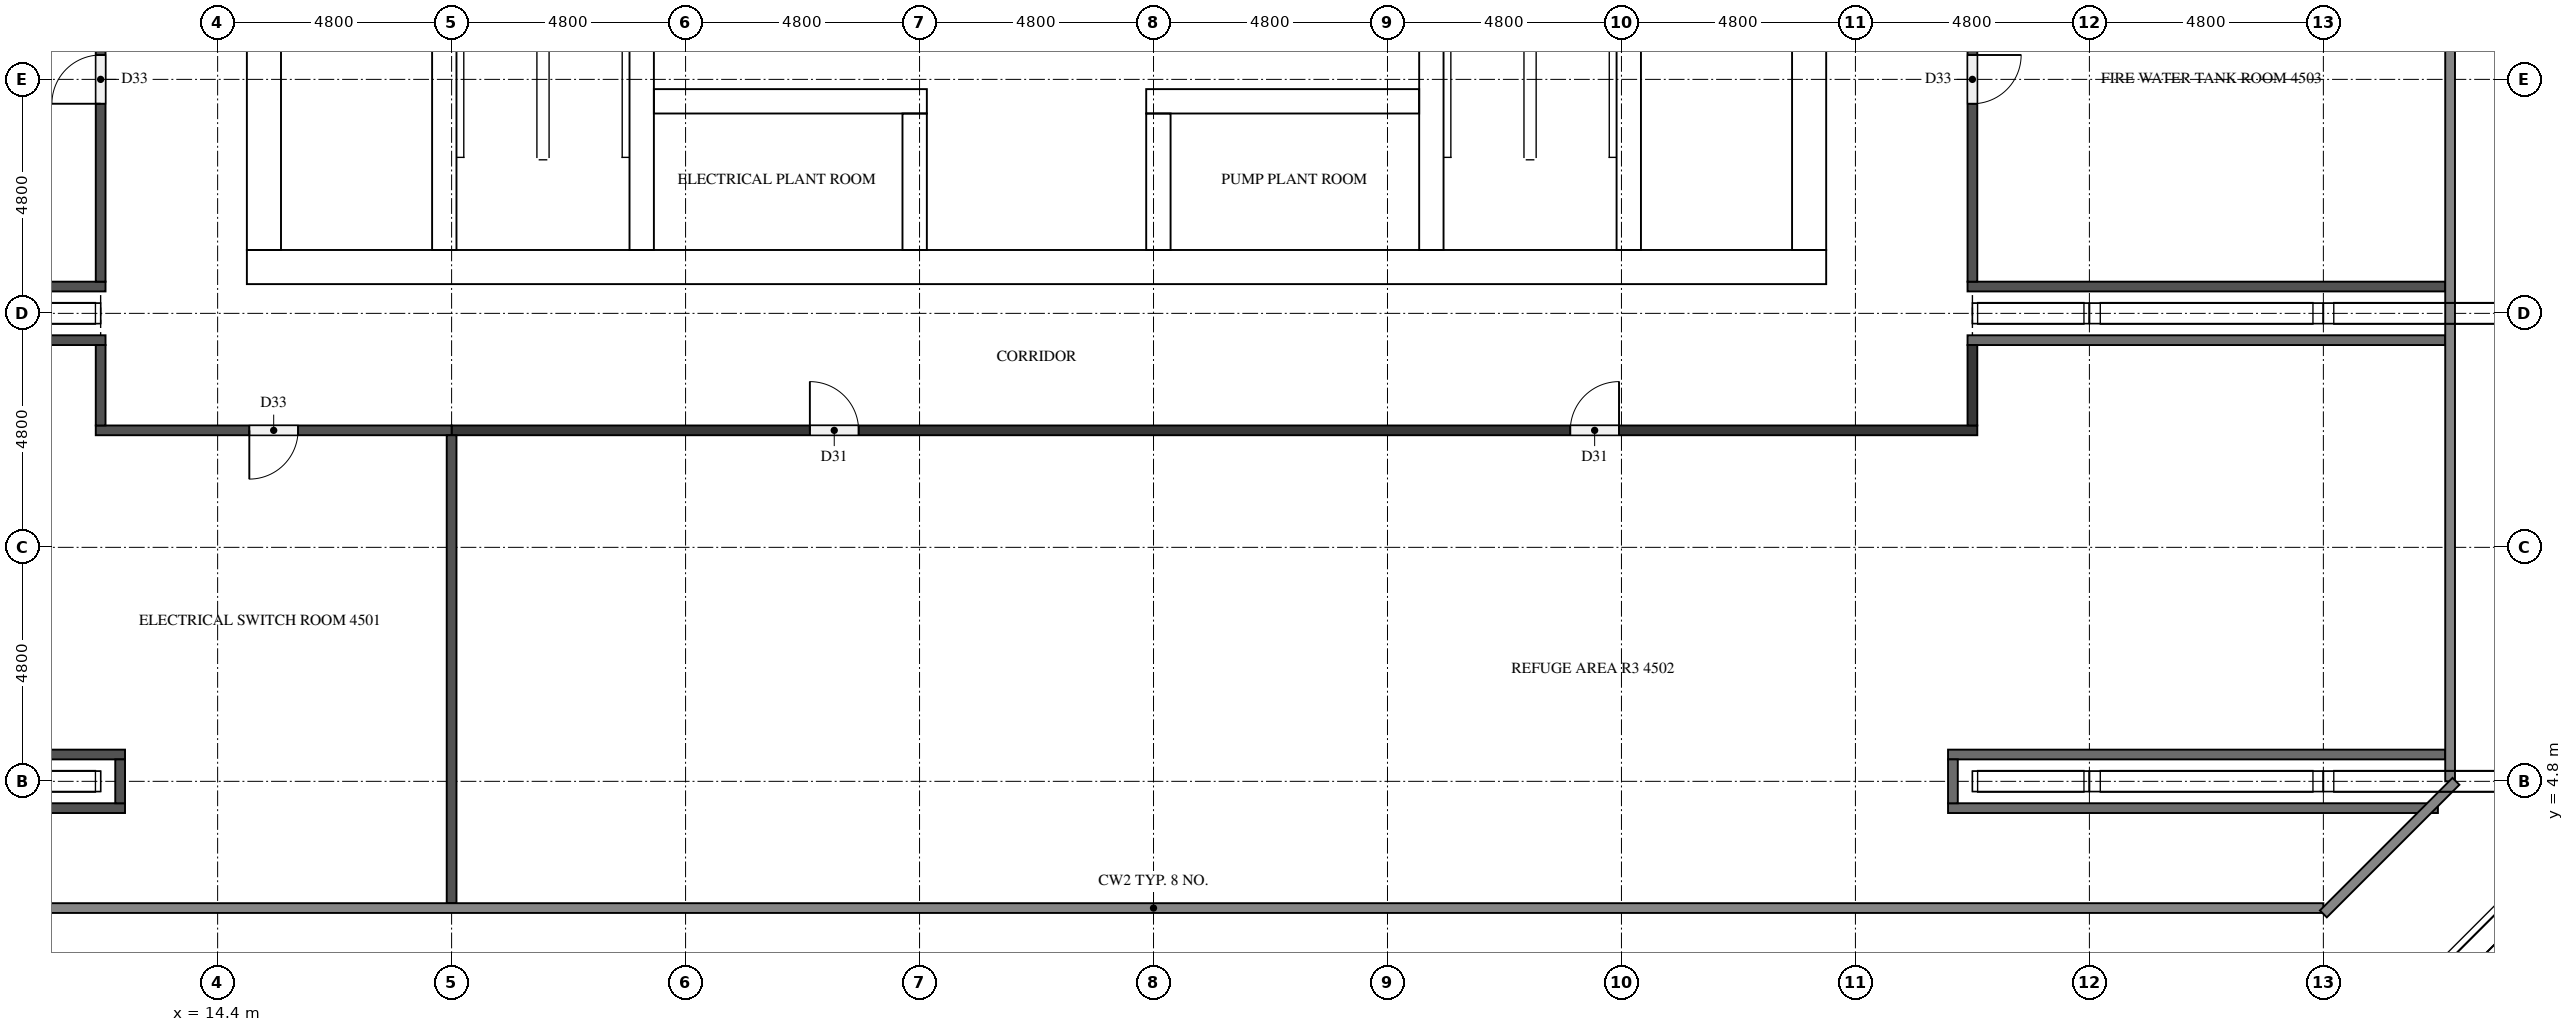
"""IFC4 building model, lengths in metres.
Left out: names, types, materials, properties, quantities, classifications, styles, units other than length and angle.
Written with IfcOpenShell. Run it as: python <this file> out.ifc"""

import sys

from ifc_helpers import new_model, si_unit, direction, frame, frame_2d, origin, place, context, subcontext, project, spatial, rectangle, extrude, element, fill, save


model = new_model("IFC4")
c1 = context("Model", 3, precision=1e-05, world=origin(), true_north=direction((0.0, 1.0)))
c2 = subcontext(c1, "Body", "Model", "MODEL_VIEW")
j1 = project(units=[si_unit("LENGTHUNIT", "METRE"), si_unit("PLANEANGLEUNIT", "RADIAN")], contexts=[c1])
p1 = place(None, origin())
s1 = spatial("IfcSite", under=j1, at=p1, CompositionType="ELEMENT")
p2 = place(p1, origin())
s2 = spatial("IfcBuilding", under=s1, at=p2, CompositionType="ELEMENT")
p3 = place(p2, frame((0.0, 0.0, 173.5)))
s3 = spatial("IfcBuildingStorey", under=s2, at=p3, CompositionType="ELEMENT", Elevation=173.5)
p4 = place(p3, frame((15.0, 15.35, 0.0), z_axis=(0.0, 0.0, 1.0), x_axis=(1.0, 0.0, 0.0)))
e1 = element("IfcWall", 1, at=p4, inside=s3, PredefinedType="SHEAR", context=c2, shape_type="SweptSolid", body=[
    extrude(rectangle(XDim=32.4, YDim=0.7, at=frame_2d((16.2, 0.0))), origin(), (0.0, 0.0, 1.0), 5.1),
])
p5 = place(p4, frame((15.3, 0.0, 0.0)))
e2 = element("IfcOpeningElement", 2, at=p5, cuts=e1, PredefinedType="OPENING", context=c2, shape_type="SweptSolid", body=[
    extrude(rectangle(XDim=1.8, YDim=2.1, at=frame_2d((0.9, 1.05))), frame((0.0, 0.36, 0.0), z_axis=(0.0, -1.0, 0.0), x_axis=(1.0, 0.0, 0.0)), (0.0, 0.0, 1.0), 0.72),
])
p6 = place(p3, frame((15.35, 15.7, 0.0), z_axis=(0.0, 0.0, 1.0), x_axis=(0.0, 1.0, 0.0)))
e3 = element("IfcWall", 3, at=p6, inside=s3, PredefinedType="SHEAR", context=c2, shape_type="SweptSolid", body=[
    extrude(rectangle(XDim=21.4, YDim=0.7, at=frame_2d((10.7, 0.0))), origin(), (0.0, 0.0, 1.0), 5.1),
])
p7 = place(p6, frame((5.06, 0.0, 0.0)))
e4 = element("IfcOpeningElement", 4, at=p7, cuts=e3, PredefinedType="OPENING", context=c2, shape_type="SweptSolid", body=[
    extrude(rectangle(XDim=1.2, YDim=2.1, at=frame_2d((0.6, 1.05))), frame((0.0, 0.36, 0.0), z_axis=(0.0, -1.0, 0.0), x_axis=(1.0, 0.0, 0.0)), (0.0, 0.0, 1.0), 0.72),
])
p8 = place(p3, frame((47.05, 15.7, 0.0), z_axis=(0.0, 0.0, 1.0), x_axis=(0.0, 1.0, 0.0)))
e5 = element("IfcWall", 5, at=p8, inside=s3, PredefinedType="SHEAR", context=c2, shape_type="SweptSolid", body=[
    extrude(rectangle(XDim=21.4, YDim=0.7, at=frame_2d((10.7, 0.0))), origin(), (0.0, 0.0, 1.0), 5.1),
])
p9 = place(p8, frame((10.4, 0.0, 0.0)))
e6 = element("IfcOpeningElement", 6, at=p9, cuts=e5, PredefinedType="OPENING", context=c2, shape_type="SweptSolid", body=[
    extrude(rectangle(XDim=1.2, YDim=2.1, at=frame_2d((0.6, 1.05))), frame((0.0, 0.36, 0.0), z_axis=(0.0, -1.0, 0.0), x_axis=(1.0, 0.0, 0.0)), (0.0, 0.0, 1.0), 0.72),
])
p10 = place(p3, frame((19.05, 15.7, 0.0), z_axis=(0.0, 0.0, 1.0), x_axis=(0.0, 1.0, 0.0)))
e7 = element("IfcWall", 7, at=p10, inside=s3, PredefinedType="SHEAR", context=c2, shape_type="SweptSolid", body=[
    extrude(rectangle(XDim=15.3, YDim=0.5, at=frame_2d((7.65, 0.0))), origin(), (0.0, 0.0, 1.0), 5.1),
])
p11 = place(p10, frame((9.75, 0.0, 0.0)))
e8 = element("IfcOpeningElement", 8, at=p11, cuts=e7, PredefinedType="OPENING", context=c2, shape_type="SweptSolid", body=[
    extrude(rectangle(XDim=1.1, YDim=2.1, at=frame_2d((0.55, 1.05))), frame((0.0, 0.26, 0.0), z_axis=(0.0, -1.0, 0.0), x_axis=(1.0, 0.0, 0.0)), (0.0, 0.0, 1.0), 0.52),
])
p12 = place(p10, frame((13.25, 0.0, 0.0)))
e9 = element("IfcOpeningElement", 9, at=p12, cuts=e7, PredefinedType="OPENING", context=c2, shape_type="SweptSolid", body=[
    extrude(rectangle(XDim=1.1, YDim=2.1, at=frame_2d((0.55, 1.05))), frame((0.0, 0.26, 0.0), z_axis=(0.0, -1.0, 0.0), x_axis=(1.0, 0.0, 0.0)), (0.0, 0.0, 1.0), 0.52),
])
p13 = place(p10, frame((0.5, 0.0, 0.0)))
e10 = element("IfcOpeningElement", 10, at=p13, cuts=e7, PredefinedType="OPENING", context=c2, shape_type="SweptSolid", body=[
    extrude(rectangle(XDim=1.2, YDim=2.1, at=frame_2d((0.6, 1.05))), frame((0.0, 0.26, 0.0), z_axis=(0.0, -1.0, 0.0), x_axis=(1.0, 0.0, 0.0)), (0.0, 0.0, 1.0), 0.52),
])
p14 = place(p3, frame((23.1, 15.7, 0.0), z_axis=(0.0, 0.0, 1.0), x_axis=(0.0, 1.0, 0.0)))
e11 = element("IfcWall", 11, at=p14, inside=s3, PredefinedType="SHEAR", context=c2, shape_type="SweptSolid", body=[
    extrude(rectangle(XDim=21.4, YDim=0.5, at=frame_2d((10.7, 0.0))), origin(), (0.0, 0.0, 1.0), 5.1),
])
p15 = place(p3, frame((39.3, 15.7, 0.0), z_axis=(0.0, 0.0, 1.0), x_axis=(0.0, 1.0, 0.0)))
e12 = element("IfcWall", 12, at=p15, inside=s3, PredefinedType="SHEAR", context=c2, shape_type="SweptSolid", body=[
    extrude(rectangle(XDim=8.55, YDim=0.5, at=frame_2d((4.275, 0.0))), origin(), (0.0, 0.0, 1.0), 5.1),
])
p16 = place(p3, frame((43.35, 15.7, 0.0), z_axis=(0.0, 0.0, 1.0), x_axis=(0.0, 1.0, 0.0)))
e13 = element("IfcWall", 13, at=p16, inside=s3, PredefinedType="SHEAR", context=c2, shape_type="SweptSolid", body=[
    extrude(rectangle(XDim=8.55, YDim=0.5, at=frame_2d((4.275, 0.0))), origin(), (0.0, 0.0, 1.0), 5.1),
])
p17 = place(p16, frame((0.5, 0.0, 0.0)))
e14 = element("IfcOpeningElement", 14, at=p17, cuts=e13, PredefinedType="OPENING", context=c2, shape_type="SweptSolid", body=[
    extrude(rectangle(XDim=1.2, YDim=2.1, at=frame_2d((0.6, 1.05))), frame((0.0, 0.26, 0.0), z_axis=(0.0, -1.0, 0.0), x_axis=(1.0, 0.0, 0.0)), (0.0, 0.0, 1.0), 0.52),
])
p18 = place(p3, frame((23.35, 18.75, 0.0), z_axis=(0.0, 0.0, 1.0), x_axis=(1.0, 0.0, 0.0)))
e15 = element("IfcWall", 15, at=p18, inside=s3, PredefinedType="SHEAR", context=c2, shape_type="SweptSolid", body=[
    extrude(rectangle(XDim=5.6, YDim=0.5, at=frame_2d((2.8, 0.0))), origin(), (0.0, 0.0, 1.0), 5.1),
])
p19 = place(p18, frame((2.05, 0.0, 0.0)))
e16 = element("IfcOpeningElement", 16, at=p19, cuts=e15, PredefinedType="OPENING", context=c2, shape_type="SweptSolid", body=[
    extrude(rectangle(XDim=1.0, YDim=2.1, at=frame_2d((0.5, 1.05))), frame((0.0, 0.26, 0.0), z_axis=(0.0, -1.0, 0.0), x_axis=(1.0, 0.0, 0.0)), (0.0, 0.0, 1.0), 0.52),
])
p20 = place(p3, frame((33.45, 18.75, 0.0), z_axis=(0.0, 0.0, 1.0), x_axis=(1.0, 0.0, 0.0)))
e17 = element("IfcWall", 17, at=p20, inside=s3, PredefinedType="SHEAR", context=c2, shape_type="SweptSolid", body=[
    extrude(rectangle(XDim=5.6, YDim=0.5, at=frame_2d((2.8, 0.0))), origin(), (0.0, 0.0, 1.0), 5.1),
])
p21 = place(p20, frame((2.55, 0.0, 0.0)))
e18 = element("IfcOpeningElement", 18, at=p21, cuts=e17, PredefinedType="OPENING", context=c2, shape_type="SweptSolid", body=[
    extrude(rectangle(XDim=1.0, YDim=2.1, at=frame_2d((0.5, 1.05))), frame((0.0, 0.26, 0.0), z_axis=(0.0, -1.0, 0.0), x_axis=(1.0, 0.0, 0.0)), (0.0, 0.0, 1.0), 0.52),
])
for number, where, z_axis, x_axis in (
    (19, (28.7, 15.7, 0.0), (0.0, 0.0, 1.0), (0.0, 1.0, 0.0)),
    (20, (33.7, 15.7, 0.0), (0.0, 0.0, 1.0), (0.0, 1.0, 0.0)),
):
    element("IfcWall", number, at=place(p3, frame(where, z_axis=z_axis, x_axis=x_axis)), inside=s3, PredefinedType="SHEAR", context=c2, shape_type="SweptSolid", body=[
        extrude(rectangle(XDim=2.8, YDim=0.5, at=frame_2d((1.4, 0.0))), origin(), (0.0, 0.0, 1.0), 5.1),
    ])
p22 = place(p3, frame((49.9, 4.25, 0.0), z_axis=(0.0, 0.0, 1.0), x_axis=(1.0, 0.0, 0.0)))
e21 = element("IfcWall", 21, at=p22, inside=s3, PredefinedType="PARTITIONING", context=c2, shape_type="SweptSolid", body=[
    extrude(rectangle(XDim=10.05, YDim=0.2, at=frame_2d((5.025, 0.0))), origin(), (0.0, 0.0, 1.0), 5.1),
])
p23 = place(p3, frame((7.25, 4.25, 0.0), z_axis=(0.0, 0.0, 1.0), x_axis=(1.0, 0.0, 0.0)))
e22 = element("IfcWall", 22, at=p23, inside=s3, PredefinedType="PARTITIONING", context=c2, shape_type="SweptSolid", body=[
    extrude(rectangle(XDim=5.25, YDim=0.2, at=frame_2d((2.625, 0.0))), origin(), (0.0, 0.0, 1.0), 5.1),
])
p24 = place(p3, frame((49.9, 5.35, 0.0), z_axis=(0.0, 0.0, 1.0), x_axis=(1.0, 0.0, 0.0)))
e23 = element("IfcWall", 23, at=p24, inside=s3, PredefinedType="PARTITIONING", context=c2, shape_type="SweptSolid", body=[
    extrude(rectangle(XDim=10.2, YDim=0.2, at=frame_2d((5.1, 0.0))), origin(), (0.0, 0.0, 1.0), 5.1),
])
p25 = place(p3, frame((7.1, 5.35, 0.0), z_axis=(0.0, 0.0, 1.0), x_axis=(1.0, 0.0, 0.0)))
e24 = element("IfcWall", 24, at=p25, inside=s3, PredefinedType="PARTITIONING", context=c2, shape_type="SweptSolid", body=[
    extrude(rectangle(XDim=5.4, YDim=0.2, at=frame_2d((2.7, 0.0))), origin(), (0.0, 0.0, 1.0), 5.1),
])
p26 = place(p3, frame((19.2, 12.0, 0.0), z_axis=(0.0, 0.0, 1.0), x_axis=(1.0, 0.0, 0.0)))
e25 = element("IfcWall", 25, at=p26, inside=s3, PredefinedType="PARTITIONING", context=c2, shape_type="SweptSolid", body=[
    extrude(rectangle(XDim=31.3, YDim=0.2, at=frame_2d((15.65, 0.0))), origin(), (0.0, 0.0, 1.0), 5.1),
])
p27 = place(p26, frame((22.95, 0.0, 0.0)))
e26 = element("IfcOpeningElement", 26, at=p27, cuts=e25, PredefinedType="OPENING", context=c2, shape_type="SweptSolid", body=[
    extrude(rectangle(XDim=1.0, YDim=2.1, at=frame_2d((0.5, 1.05))), frame((0.0, 0.11, 0.0), z_axis=(0.0, -1.0, 0.0), x_axis=(1.0, 0.0, 0.0)), (0.0, 0.0, 1.0), 0.22),
])
p28 = place(p26, frame((7.35, 0.0, 0.0)))
e27 = element("IfcOpeningElement", 27, at=p28, cuts=e25, PredefinedType="OPENING", context=c2, shape_type="SweptSolid", body=[
    extrude(rectangle(XDim=1.0, YDim=2.1, at=frame_2d((0.5, 1.05))), frame((0.0, 0.11, 0.0), z_axis=(0.0, -1.0, 0.0), x_axis=(1.0, 0.0, 0.0)), (0.0, 0.0, 1.0), 0.22),
])
p29 = place(p3, frame((19.2, 12.0, 0.0), z_axis=(0.0, 0.0, 1.0), x_axis=(-1.0, 0.0, 0.0)))
e28 = element("IfcWall", 28, at=p29, inside=s3, PredefinedType="PARTITIONING", context=c2, shape_type="SweptSolid", body=[
    extrude(rectangle(XDim=7.3, YDim=0.2, at=frame_2d((3.65, 0.0))), origin(), (0.0, 0.0, 1.0), 5.1),
])
p30 = place(p29, frame((3.15, 0.0, 0.0)))
e29 = element("IfcOpeningElement", 29, at=p30, cuts=e28, PredefinedType="OPENING", context=c2, shape_type="SweptSolid", body=[
    extrude(rectangle(XDim=1.0, YDim=2.1, at=frame_2d((0.5, 1.05))), frame((0.0, 0.11, 0.0), z_axis=(0.0, -1.0, 0.0), x_axis=(1.0, 0.0, 0.0)), (0.0, 0.0, 1.0), 0.22),
])
p31 = place(p3, frame((50.3, 13.85, 0.0), z_axis=(0.0, 0.0, 1.0), x_axis=(1.0, 0.0, 0.0)))
e30 = element("IfcWall", 30, at=p31, inside=s3, PredefinedType="PARTITIONING", context=c2, shape_type="SweptSolid", body=[
    extrude(rectangle(XDim=9.8, YDim=0.2, at=frame_2d((4.9, 0.0))), origin(), (0.0, 0.0, 1.0), 5.1),
])
for number, where, z_axis, x_axis in (
    (31, (7.1, 13.85, 0.0), (0.0, 0.0, 1.0), (1.0, 0.0, 0.0)),
    (32, (7.1, 14.95, 0.0), (0.0, 0.0, 1.0), (1.0, 0.0, 0.0)),
):
    element("IfcWall", number, at=place(p3, frame(where, z_axis=z_axis, x_axis=x_axis)), inside=s3, PredefinedType="PARTITIONING", context=c2, shape_type="SweptSolid", body=[
        extrude(rectangle(XDim=5.0, YDim=0.2, at=frame_2d((2.5, 0.0))), origin(), (0.0, 0.0, 1.0), 5.1),
    ])
p32 = place(p3, frame((50.3, 14.95, 0.0), z_axis=(0.0, 0.0, 1.0), x_axis=(1.0, 0.0, 0.0)))
e33 = element("IfcWall", 33, at=p32, inside=s3, PredefinedType="PARTITIONING", context=c2, shape_type="SweptSolid", body=[
    extrude(rectangle(XDim=9.8, YDim=0.2, at=frame_2d((4.9, 0.0))), origin(), (0.0, 0.0, 1.0), 5.1),
])
p33 = place(p3, frame((12.0, 12.1, 0.0), z_axis=(0.0, 0.0, 1.0), x_axis=(0.0, 1.0, 0.0)))
e34 = element("IfcWall", 34, at=p33, inside=s3, PredefinedType="PARTITIONING", context=c2, shape_type="SweptSolid", body=[
    extrude(rectangle(XDim=1.65, YDim=0.2, at=frame_2d((0.825, 0.0))), origin(), (0.0, 0.0, 1.0), 5.1),
])
p34 = place(p3, frame((12.0, 15.05, 0.0), z_axis=(0.0, 0.0, 1.0), x_axis=(0.0, 1.0, 0.0)))
e35 = element("IfcWall", 35, at=p34, inside=s3, PredefinedType="PARTITIONING", context=c2, shape_type="SweptSolid", body=[
    extrude(rectangle(XDim=8.3, YDim=0.2, at=frame_2d((4.15, 0.0))), origin(), (0.0, 0.0, 1.0), 5.1),
])
p35 = place(p34, frame((3.65, 0.0, 0.0)))
e36 = element("IfcOpeningElement", 36, at=p35, cuts=e35, PredefinedType="OPENING", context=c2, shape_type="SweptSolid", body=[
    extrude(rectangle(XDim=1.0, YDim=2.1, at=frame_2d((0.5, 1.05))), frame((0.0, 0.11, 0.0), z_axis=(0.0, -1.0, 0.0), x_axis=(1.0, 0.0, 0.0)), (0.0, 0.0, 1.0), 0.22),
])
p36 = place(p3, frame((12.4, 4.35, 0.0), z_axis=(0.0, 0.0, 1.0), x_axis=(0.0, 1.0, 0.0)))
e37 = element("IfcWall", 37, at=p36, inside=s3, PredefinedType="PARTITIONING", context=c2, shape_type="SweptSolid", body=[
    extrude(rectangle(XDim=0.9, YDim=0.2, at=frame_2d((0.45, 0.0))), origin(), (0.0, 0.0, 1.0), 5.1),
])
p37 = place(p3, frame((19.2, 2.3, 0.0), z_axis=(0.0, 0.0, 1.0), x_axis=(0.0, 1.0, 0.0)))
e38 = element("IfcWall", 38, at=p37, inside=s3, PredefinedType="PARTITIONING", context=c2, shape_type="SweptSolid", body=[
    extrude(rectangle(XDim=9.6, YDim=0.2, at=frame_2d((4.8, 0.0))), origin(), (0.0, 0.0, 1.0), 5.1),
])
p38 = place(p3, frame((50.0, 4.35, 0.0), z_axis=(0.0, 0.0, 1.0), x_axis=(0.0, 1.0, 0.0)))
e39 = element("IfcWall", 39, at=p38, inside=s3, PredefinedType="PARTITIONING", context=c2, shape_type="SweptSolid", body=[
    extrude(rectangle(XDim=0.9, YDim=0.2, at=frame_2d((0.45, 0.0))), origin(), (0.0, 0.0, 1.0), 5.1),
])
p39 = place(p3, frame((50.4, 12.1, 0.0), z_axis=(0.0, 0.0, 1.0), x_axis=(0.0, 1.0, 0.0)))
e40 = element("IfcWall", 40, at=p39, inside=s3, PredefinedType="PARTITIONING", context=c2, shape_type="SweptSolid", body=[
    extrude(rectangle(XDim=1.65, YDim=0.2, at=frame_2d((0.825, 0.0))), origin(), (0.0, 0.0, 1.0), 5.1),
])
p40 = place(p3, frame((50.4, 23.35, 0.0), z_axis=(0.0, 0.0, 1.0), x_axis=(0.0, -1.0, 0.0)))
e41 = element("IfcWall", 41, at=p40, inside=s3, PredefinedType="PARTITIONING", context=c2, shape_type="SweptSolid", body=[
    extrude(rectangle(XDim=8.3, YDim=0.2, at=frame_2d((4.15, 0.0))), origin(), (0.0, 0.0, 1.0), 5.1),
])
p41 = place(p40, frame((3.65, 0.0, 0.0)))
e42 = element("IfcOpeningElement", 42, at=p41, cuts=e41, PredefinedType="OPENING", context=c2, shape_type="SweptSolid", body=[
    extrude(rectangle(XDim=1.0, YDim=2.1, at=frame_2d((0.5, 1.05))), frame((0.0, 0.11, 0.0), z_axis=(0.0, -1.0, 0.0), x_axis=(1.0, 0.0, 0.0)), (0.0, 0.0, 1.0), 0.22),
])
p42 = place(p13, frame((1.2, 0.0, 0.0), z_axis=(0.0, 0.0, 1.0), x_axis=(-1.0, 0.0, 0.0)))
e43 = element("IfcDoor", 43, at=p42, inside=s3, OperationType="SINGLE_SWING_LEFT", PredefinedType="DOOR", context=c2, shape_type="SweptSolid", body=[
    extrude(rectangle(XDim=1.2, YDim=2.1, at=frame_2d((0.6, 1.05))), frame((0.0, 0.025, 0.0), z_axis=(0.0, -1.0, 0.0), x_axis=(1.0, 0.0, 0.0)), (0.0, 0.0, 1.0), 0.05),
])
fill(e10, e43)
p43 = place(p17, origin())
e44 = element("IfcDoor", 44, at=p43, inside=s3, OperationType="SINGLE_SWING_RIGHT", PredefinedType="DOOR", context=c2, shape_type="SweptSolid", body=[
    extrude(rectangle(XDim=1.2, YDim=2.1, at=frame_2d((0.6, 1.05))), frame((0.0, 0.025, 0.0), z_axis=(0.0, -1.0, 0.0), x_axis=(1.0, 0.0, 0.0)), (0.0, 0.0, 1.0), 0.05),
])
fill(e14, e44)
p44 = place(p5, frame((1.8, 0.0, 0.0), z_axis=(0.0, 0.0, 1.0), x_axis=(-1.0, 0.0, 0.0)))
e45 = element("IfcDoor", 45, at=p44, inside=s3, OperationType="DOUBLE_DOOR_SINGLE_SWING", PredefinedType="DOOR", context=c2, shape_type="SweptSolid", body=[
    extrude(rectangle(XDim=1.8, YDim=2.1, at=frame_2d((0.9, 1.05))), frame((0.0, 0.025, 0.0), z_axis=(0.0, -1.0, 0.0), x_axis=(1.0, 0.0, 0.0)), (0.0, 0.0, 1.0), 0.05),
])
fill(e2, e45)
p45 = place(p19, origin())
e46 = element("IfcDoor", 46, at=p45, inside=s3, OperationType="SINGLE_SWING_RIGHT", PredefinedType="DOOR", context=c2, shape_type="SweptSolid", body=[
    extrude(rectangle(XDim=1.0, YDim=2.1, at=frame_2d((0.5, 1.05))), frame((0.0, 0.025, 0.0), z_axis=(0.0, -1.0, 0.0), x_axis=(1.0, 0.0, 0.0)), (0.0, 0.0, 1.0), 0.05),
])
fill(e16, e46)
p46 = place(p21, origin())
e47 = element("IfcDoor", 47, at=p46, inside=s3, OperationType="SINGLE_SWING_LEFT", PredefinedType="DOOR", context=c2, shape_type="SweptSolid", body=[
    extrude(rectangle(XDim=1.0, YDim=2.1, at=frame_2d((0.5, 1.05))), frame((0.0, 0.025, 0.0), z_axis=(0.0, -1.0, 0.0), x_axis=(1.0, 0.0, 0.0)), (0.0, 0.0, 1.0), 0.05),
])
fill(e18, e47)
p47 = place(p30, origin())
e48 = element("IfcDoor", 48, at=p47, inside=s3, OperationType="SINGLE_SWING_RIGHT", PredefinedType="DOOR", context=c2, shape_type="SweptSolid", body=[
    extrude(rectangle(XDim=1.0, YDim=2.1, at=frame_2d((0.5, 1.05))), frame((0.0, 0.025, 0.0), z_axis=(0.0, -1.0, 0.0), x_axis=(1.0, 0.0, 0.0)), (0.0, 0.0, 1.0), 0.05),
])
fill(e29, e48)
p48 = place(p27, origin())
e49 = element("IfcDoor", 49, at=p48, inside=s3, OperationType="SINGLE_SWING_RIGHT", PredefinedType="DOOR", context=c2, shape_type="SweptSolid", body=[
    extrude(rectangle(XDim=1.0, YDim=2.1, at=frame_2d((0.5, 1.05))), frame((0.0, 0.025, 0.0), z_axis=(0.0, -1.0, 0.0), x_axis=(1.0, 0.0, 0.0)), (0.0, 0.0, 1.0), 0.05),
])
fill(e26, e49)
p49 = place(p28, origin())
e50 = element("IfcDoor", 50, at=p49, inside=s3, OperationType="SINGLE_SWING_LEFT", PredefinedType="DOOR", context=c2, shape_type="SweptSolid", body=[
    extrude(rectangle(XDim=1.0, YDim=2.1, at=frame_2d((0.5, 1.05))), frame((0.0, 0.025, 0.0), z_axis=(0.0, -1.0, 0.0), x_axis=(1.0, 0.0, 0.0)), (0.0, 0.0, 1.0), 0.05),
])
fill(e27, e50)
p50 = place(p41, origin())
e51 = element("IfcDoor", 51, at=p50, inside=s3, OperationType="SINGLE_SWING_LEFT", PredefinedType="DOOR", context=c2, shape_type="SweptSolid", body=[
    extrude(rectangle(XDim=1.0, YDim=2.1, at=frame_2d((0.5, 1.05))), frame((0.0, 0.025, 0.0), z_axis=(0.0, -1.0, 0.0), x_axis=(1.0, 0.0, 0.0)), (0.0, 0.0, 1.0), 0.05),
])
fill(e42, e51)
p51 = place(p35, origin())
e52 = element("IfcDoor", 52, at=p51, inside=s3, OperationType="SINGLE_SWING_LEFT", PredefinedType="DOOR", context=c2, shape_type="SweptSolid", body=[
    extrude(rectangle(XDim=1.0, YDim=2.1, at=frame_2d((0.5, 1.05))), frame((0.0, 0.025, 0.0), z_axis=(0.0, -1.0, 0.0), x_axis=(1.0, 0.0, 0.0)), (0.0, 0.0, 1.0), 0.05),
])
fill(e36, e52)
save(model, sys.argv[1])
